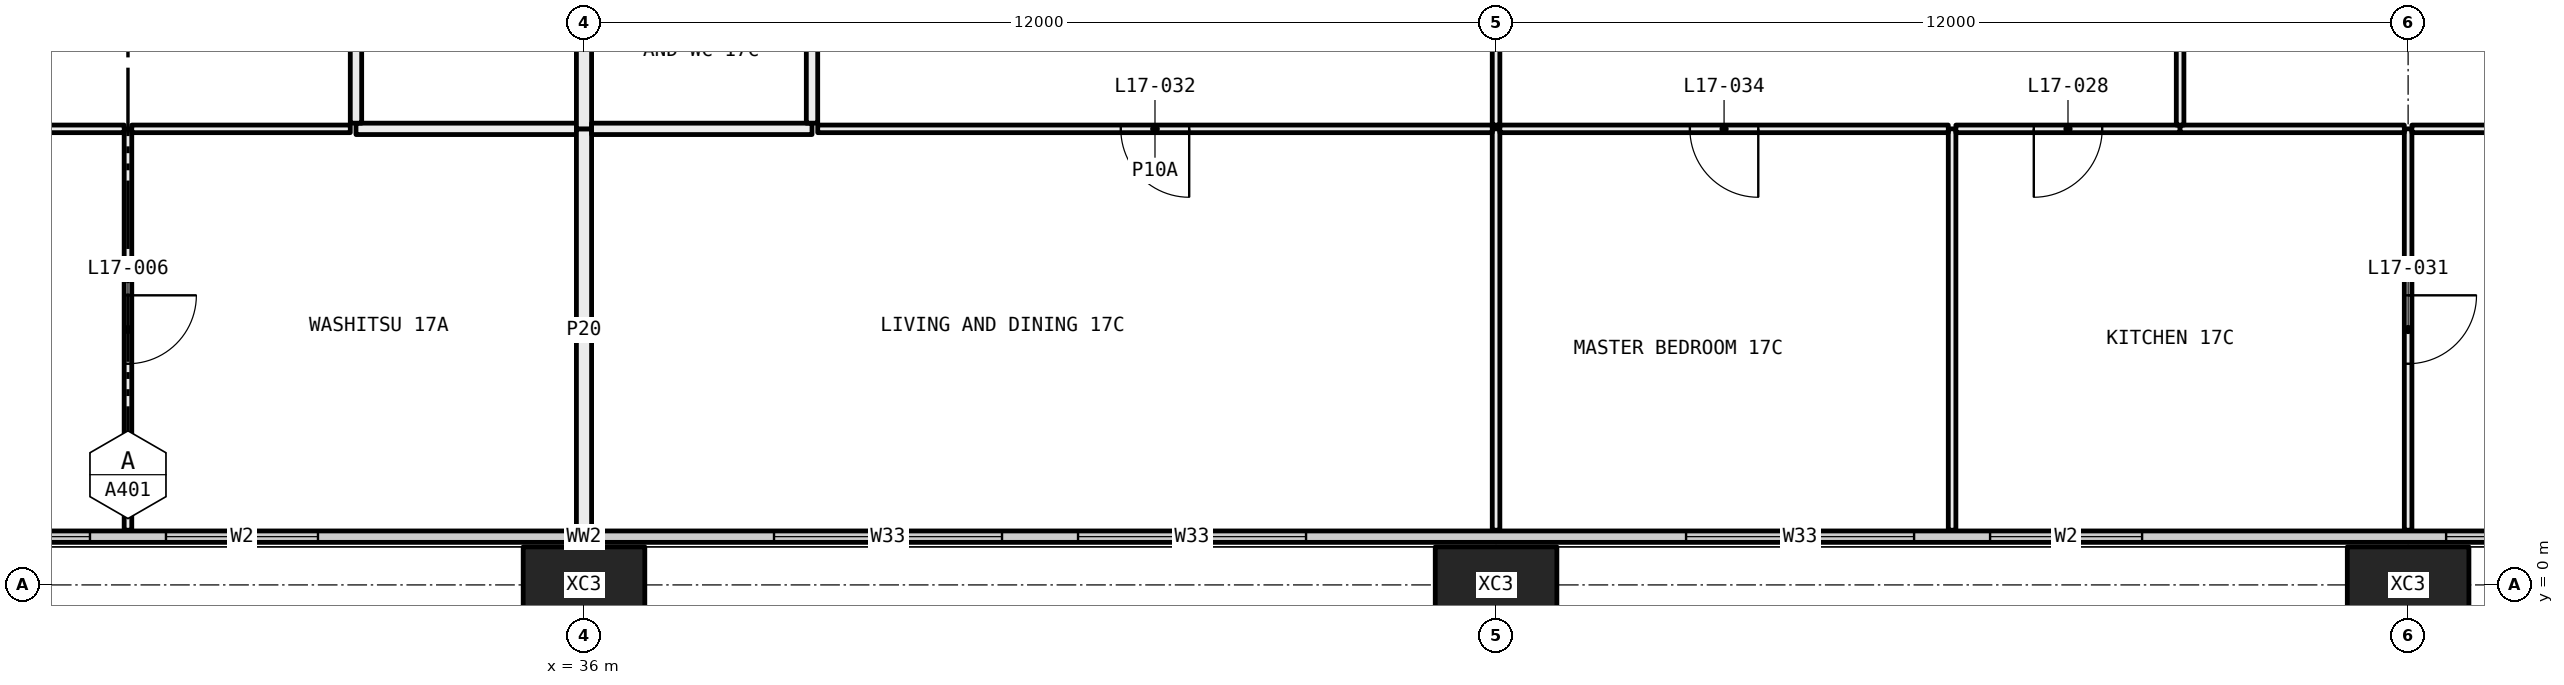
"""IFC4 building model, lengths in metres.
Left out: names, types, materials, properties, quantities, classifications, styles, units other than length and angle.
Written with IfcOpenShell. Run it as: python <this file> out.ifc"""

import sys

from ifc_helpers import new_model, si_unit, direction, frame, frame_2d, origin, origin_2d, place, context, subcontext, project, spatial, rectangle, hollow_rectangle, extrude, element, fill, save


model = new_model("IFC4")
c1 = context("Model", 3, precision=1e-05, world=origin(), true_north=direction((0.0, 1.0)))
c2 = subcontext(c1, "Body", "Model", "MODEL_VIEW")
j1 = project(units=[si_unit("LENGTHUNIT", "METRE"), si_unit("PLANEANGLEUNIT", "RADIAN")], contexts=[c1])
p1 = place(None, origin())
s1 = spatial("IfcSite", under=j1, at=p1, CompositionType="ELEMENT")
p2 = place(p1, origin())
s2 = spatial("IfcBuilding", under=s1, at=p2, CompositionType="ELEMENT")
p3 = place(p2, frame((0.0, 0.0, 71.4)))
s3 = spatial("IfcBuildingStorey", under=s2, at=p3, CompositionType="ELEMENT", Elevation=71.4)
for number, where, z_axis, x_axis in (
    (1, (36.0, 0.0, -0.4), (0.0, 0.0, 1.0), (1.0, 0.0, 0.0)),
    (2, (48.0, 0.0, -0.4), (0.0, 0.0, 1.0), (1.0, 0.0, 0.0)),
    (3, (60.0, 0.0, -0.4), (0.0, 0.0, 1.0), (1.0, 0.0, 0.0)),
):
    element("IfcColumn", number, at=place(p3, frame(where, z_axis=z_axis, x_axis=x_axis)), inside=s3, PredefinedType="COLUMN", context=c2, shape_type="SweptSolid", body=[
        extrude(hollow_rectangle(XDim=1.6, YDim=1.0, WallThickness=0.065, at=origin_2d()), origin(), (0.0, 0.0, 1.0), 3.45),
    ])
p4 = place(p3, frame((6.56, 0.635, 0.0), z_axis=(0.0, 0.0, 1.0), x_axis=(1.0, 0.0, 0.0)))
e4 = element("IfcWall", 4, at=p4, inside=s3, PredefinedType="ELEMENTEDWALL", context=c2, shape_type="SweptSolid", body=[
    extrude(rectangle(XDim=58.88, YDim=0.15, at=frame_2d((29.44, 0.0))), origin(), (0.0, 0.0, 1.0), 3.05),
])
p5 = place(p4, frame((0.44, 0.0, 0.45)))
e5 = element("IfcOpeningElement", 5, at=p5, cuts=e4, PredefinedType="OPENING", context=c2, shape_type="SweptSolid", body=[
    extrude(rectangle(XDim=4.5, YDim=2.55, at=frame_2d((2.25, 1.275))), frame((0.0, 0.085, 0.0), z_axis=(0.0, -1.0, 0.0), x_axis=(1.0, 0.0, 0.0)), (0.0, 0.0, 1.0), 0.17),
])
p6 = place(p4, frame((7.94, 0.0, 0.45)))
e6 = element("IfcOpeningElement", 6, at=p6, cuts=e4, PredefinedType="OPENING", context=c2, shape_type="SweptSolid", body=[
    extrude(rectangle(XDim=3.0, YDim=2.55, at=frame_2d((1.5, 1.275))), frame((0.0, 0.085, 0.0), z_axis=(0.0, -1.0, 0.0), x_axis=(1.0, 0.0, 0.0)), (0.0, 0.0, 1.0), 0.17),
])
p7 = place(p4, frame((11.94, 0.0, 0.45)))
e7 = element("IfcOpeningElement", 7, at=p7, cuts=e4, PredefinedType="OPENING", context=c2, shape_type="SweptSolid", body=[
    extrude(rectangle(XDim=3.0, YDim=2.55, at=frame_2d((1.5, 1.275))), frame((0.0, 0.085, 0.0), z_axis=(0.0, -1.0, 0.0), x_axis=(1.0, 0.0, 0.0)), (0.0, 0.0, 1.0), 0.17),
])
p8 = place(p4, frame((19.94, 0.0, 0.45)))
e8 = element("IfcOpeningElement", 8, at=p8, cuts=e4, PredefinedType="OPENING", context=c2, shape_type="SweptSolid", body=[
    extrude(rectangle(XDim=3.0, YDim=2.55, at=frame_2d((1.5, 1.275))), frame((0.0, 0.085, 0.0), z_axis=(0.0, -1.0, 0.0), x_axis=(1.0, 0.0, 0.0)), (0.0, 0.0, 1.0), 0.17),
])
p9 = place(p4, frame((23.94, 0.0, 0.45)))
e9 = element("IfcOpeningElement", 9, at=p9, cuts=e4, PredefinedType="OPENING", context=c2, shape_type="SweptSolid", body=[
    extrude(rectangle(XDim=2.0, YDim=2.55, at=frame_2d((1.0, 1.275))), frame((0.0, 0.085, 0.0), z_axis=(0.0, -1.0, 0.0), x_axis=(1.0, 0.0, 0.0)), (0.0, 0.0, 1.0), 0.17),
])
p10 = place(p4, frame((31.94, 0.0, 0.45)))
e10 = element("IfcOpeningElement", 10, at=p10, cuts=e4, PredefinedType="OPENING", context=c2, shape_type="SweptSolid", body=[
    extrude(rectangle(XDim=3.0, YDim=2.55, at=frame_2d((1.5, 1.275))), frame((0.0, 0.085, 0.0), z_axis=(0.0, -1.0, 0.0), x_axis=(1.0, 0.0, 0.0)), (0.0, 0.0, 1.0), 0.17),
])
p11 = place(p4, frame((35.94, 0.0, 0.45)))
e11 = element("IfcOpeningElement", 11, at=p11, cuts=e4, PredefinedType="OPENING", context=c2, shape_type="SweptSolid", body=[
    extrude(rectangle(XDim=3.0, YDim=2.55, at=frame_2d((1.5, 1.275))), frame((0.0, 0.085, 0.0), z_axis=(0.0, -1.0, 0.0), x_axis=(1.0, 0.0, 0.0)), (0.0, 0.0, 1.0), 0.17),
])
p12 = place(p4, frame((43.94, 0.0, 0.45)))
e12 = element("IfcOpeningElement", 12, at=p12, cuts=e4, PredefinedType="OPENING", context=c2, shape_type="SweptSolid", body=[
    extrude(rectangle(XDim=3.0, YDim=2.55, at=frame_2d((1.5, 1.275))), frame((0.0, 0.085, 0.0), z_axis=(0.0, -1.0, 0.0), x_axis=(1.0, 0.0, 0.0)), (0.0, 0.0, 1.0), 0.17),
])
p13 = place(p4, frame((47.94, 0.0, 0.45)))
e13 = element("IfcOpeningElement", 13, at=p13, cuts=e4, PredefinedType="OPENING", context=c2, shape_type="SweptSolid", body=[
    extrude(rectangle(XDim=2.0, YDim=2.55, at=frame_2d((1.0, 1.275))), frame((0.0, 0.085, 0.0), z_axis=(0.0, -1.0, 0.0), x_axis=(1.0, 0.0, 0.0)), (0.0, 0.0, 1.0), 0.17),
])
p14 = place(p4, frame((53.94, 0.0, 0.45)))
e14 = element("IfcOpeningElement", 14, at=p14, cuts=e4, PredefinedType="OPENING", context=c2, shape_type="SweptSolid", body=[
    extrude(rectangle(XDim=4.5, YDim=2.55, at=frame_2d((2.25, 1.275))), frame((0.0, 0.085, 0.0), z_axis=(0.0, -1.0, 0.0), x_axis=(1.0, 0.0, 0.0)), (0.0, 0.0, 1.0), 0.17),
])
p15 = place(p3, frame((30.0, 0.72, 0.0), z_axis=(0.0, 0.0, 1.0), x_axis=(0.0, 1.0, 0.0)))
e15 = element("IfcWall", 15, at=p15, inside=s3, PredefinedType="PARTITIONING", context=c2, shape_type="SweptSolid", body=[
    extrude(rectangle(XDim=5.28, YDim=0.1, at=frame_2d((2.64, 0.0))), origin(), (0.0, 0.0, 1.0), 3.05),
])
p16 = place(p15, frame((2.19, 0.0, 0.0)))
e16 = element("IfcOpeningElement", 16, at=p16, cuts=e15, PredefinedType="OPENING", context=c2, shape_type="SweptSolid", body=[
    extrude(rectangle(XDim=0.9, YDim=2.1, at=frame_2d((0.45, 1.05))), frame((0.0, 0.06, 0.0), z_axis=(0.0, -1.0, 0.0), x_axis=(1.0, 0.0, 0.0)), (0.0, 0.0, 1.0), 0.12),
])
p17 = place(p3, frame((29.95, 6.0, 0.0), z_axis=(0.0, 0.0, 1.0), x_axis=(-1.0, 0.0, 0.0)))
e17 = element("IfcWall", 17, at=p17, inside=s3, PredefinedType="PARTITIONING", context=c2, shape_type="SweptSolid", body=[
    extrude(rectangle(XDim=6.05, YDim=0.1, at=frame_2d((3.025, 0.0))), origin(), (0.0, 0.0, 1.0), 2.45),
])
p18 = place(p17, frame((2.575, 0.0, 0.0)))
e18 = element("IfcOpeningElement", 18, at=p18, cuts=e17, PredefinedType="OPENING", context=c2, shape_type="SweptSolid", body=[
    extrude(rectangle(XDim=0.9, YDim=2.1, at=frame_2d((0.45, 1.05))), frame((0.0, 0.06, 0.0), z_axis=(0.0, -1.0, 0.0), x_axis=(1.0, 0.0, 0.0)), (0.0, 0.0, 1.0), 0.12),
])
p19 = place(p3, frame((32.925, 6.0, 0.0), z_axis=(0.0, 0.0, 1.0), x_axis=(-1.0, 0.0, 0.0)))
e19 = element("IfcWall", 19, at=p19, inside=s3, PredefinedType="PARTITIONING", context=c2, shape_type="SweptSolid", body=[
    extrude(rectangle(XDim=2.875, YDim=0.1, at=frame_2d((1.438, 0.0))), origin(), (0.0, 0.0, 1.0), 3.05),
])
p20 = place(p3, frame((35.9, 6.0, 0.0), z_axis=(0.0, 0.0, 1.0), x_axis=(-1.0, 0.0, 0.0)))
e20 = element("IfcWall", 20, at=p20, inside=s3, PredefinedType="PARTITIONING", context=c2, shape_type="SweptSolid", body=[
    extrude(rectangle(XDim=2.9, YDim=0.15, at=frame_2d((1.45, 0.0))), origin(), (0.0, 0.0, 1.0), 3.05),
])
p21 = place(p3, frame((36.0, 0.72, 0.0), z_axis=(0.0, 0.0, 1.0), x_axis=(0.0, 1.0, 0.0)))
e21 = element("IfcWall", 21, at=p21, inside=s3, PredefinedType="PARTITIONING", context=c2, shape_type="SweptSolid", body=[
    extrude(rectangle(XDim=5.28, YDim=0.2, at=frame_2d((2.64, 0.0))), origin(), (0.0, 0.0, 1.0), 2.45),
])
p22 = place(p3, frame((33.0, 6.075, 0.0), z_axis=(0.0, 0.0, 1.0), x_axis=(0.0, 1.0, 0.0)))
e22 = element("IfcWall", 22, at=p22, inside=s3, PredefinedType="PARTITIONING", context=c2, shape_type="SweptSolid", body=[
    extrude(rectangle(XDim=5.925, YDim=0.15, at=frame_2d((2.962, 0.0))), origin(), (0.0, 0.0, 1.0), 2.45),
])
p23 = place(p22, frame((2.512, 0.0, 0.0)))
e23 = element("IfcOpeningElement", 23, at=p23, cuts=e22, PredefinedType="OPENING", context=c2, shape_type="SweptSolid", body=[
    extrude(rectangle(XDim=0.9, YDim=2.1, at=frame_2d((0.45, 1.05))), frame((0.0, 0.085, 0.0), z_axis=(0.0, -1.0, 0.0), x_axis=(1.0, 0.0, 0.0)), (0.0, 0.0, 1.0), 0.17),
])
p24 = place(p3, frame((36.0, 6.0, 0.0), z_axis=(0.0, 0.0, 1.0), x_axis=(0.0, 1.0, 0.0)))
e24 = element("IfcWall", 24, at=p24, inside=s3, PredefinedType="PARTITIONING", context=c2, shape_type="SweptSolid", body=[
    extrude(rectangle(XDim=5.2, YDim=0.2, at=frame_2d((2.6, 0.0))), origin(), (0.0, 0.0, 1.0), 2.45),
])
p25 = place(p3, frame((48.0, 0.72, 0.0), z_axis=(0.0, 0.0, 1.0), x_axis=(0.0, 1.0, 0.0)))
e25 = element("IfcWall", 25, at=p25, inside=s3, PredefinedType="PARTITIONING", context=c2, shape_type="SweptSolid", body=[
    extrude(rectangle(XDim=5.28, YDim=0.1, at=frame_2d((2.64, 0.0))), origin(), (0.0, 0.0, 1.0), 2.45),
])
p26 = place(p3, frame((39.0, 6.0, 0.0), z_axis=(0.0, 0.0, 1.0), x_axis=(-1.0, 0.0, 0.0)))
e26 = element("IfcWall", 26, at=p26, inside=s3, PredefinedType="PARTITIONING", context=c2, shape_type="SweptSolid", body=[
    extrude(rectangle(XDim=2.9, YDim=0.15, at=frame_2d((1.45, 0.0))), origin(), (0.0, 0.0, 1.0), 3.05),
])
p27 = place(p3, frame((47.95, 6.0, 0.0), z_axis=(0.0, 0.0, 1.0), x_axis=(-1.0, 0.0, 0.0)))
e27 = element("IfcWall", 27, at=p27, inside=s3, PredefinedType="PARTITIONING", context=c2, shape_type="SweptSolid", body=[
    extrude(rectangle(XDim=8.875, YDim=0.1, at=frame_2d((4.438, 0.0))), origin(), (0.0, 0.0, 1.0), 2.45),
])
p28 = place(p27, frame((3.988, 0.0, 0.0)))
e28 = element("IfcOpeningElement", 28, at=p28, cuts=e27, PredefinedType="OPENING", context=c2, shape_type="SweptSolid", body=[
    extrude(rectangle(XDim=0.9, YDim=2.1, at=frame_2d((0.45, 1.05))), frame((0.0, 0.06, 0.0), z_axis=(0.0, -1.0, 0.0), x_axis=(1.0, 0.0, 0.0)), (0.0, 0.0, 1.0), 0.12),
])
p29 = place(p3, frame((54.0, 0.72, 0.0), z_axis=(0.0, 0.0, 1.0), x_axis=(0.0, 1.0, 0.0)))
e29 = element("IfcWall", 29, at=p29, inside=s3, PredefinedType="PARTITIONING", context=c2, shape_type="SweptSolid", body=[
    extrude(rectangle(XDim=5.28, YDim=0.1, at=frame_2d((2.64, 0.0))), origin(), (0.0, 0.0, 1.0), 3.05),
])
p30 = place(p3, frame((53.95, 6.0, 0.0), z_axis=(0.0, 0.0, 1.0), x_axis=(-1.0, 0.0, 0.0)))
e30 = element("IfcWall", 30, at=p30, inside=s3, PredefinedType="PARTITIONING", context=c2, shape_type="SweptSolid", body=[
    extrude(rectangle(XDim=5.9, YDim=0.1, at=frame_2d((2.95, 0.0))), origin(), (0.0, 0.0, 1.0), 2.45),
])
p31 = place(p30, frame((2.5, 0.0, 0.0)))
e31 = element("IfcOpeningElement", 31, at=p31, cuts=e30, PredefinedType="OPENING", context=c2, shape_type="SweptSolid", body=[
    extrude(rectangle(XDim=0.9, YDim=2.1, at=frame_2d((0.45, 1.05))), frame((0.0, 0.06, 0.0), z_axis=(0.0, -1.0, 0.0), x_axis=(1.0, 0.0, 0.0)), (0.0, 0.0, 1.0), 0.12),
])
p32 = place(p3, frame((60.0, 0.72, 0.0), z_axis=(0.0, 0.0, 1.0), x_axis=(0.0, 1.0, 0.0)))
e32 = element("IfcWall", 32, at=p32, inside=s3, PredefinedType="PARTITIONING", context=c2, shape_type="SweptSolid", body=[
    extrude(rectangle(XDim=5.28, YDim=0.1, at=frame_2d((2.64, 0.0))), origin(), (0.0, 0.0, 1.0), 2.45),
])
p33 = place(p32, frame((2.19, 0.0, 0.0)))
e33 = element("IfcOpeningElement", 33, at=p33, cuts=e32, PredefinedType="OPENING", context=c2, shape_type="SweptSolid", body=[
    extrude(rectangle(XDim=0.9, YDim=2.1, at=frame_2d((0.45, 1.05))), frame((0.0, 0.06, 0.0), z_axis=(0.0, -1.0, 0.0), x_axis=(1.0, 0.0, 0.0)), (0.0, 0.0, 1.0), 0.12),
])
p34 = place(p3, frame((57.0, 6.0, 0.0), z_axis=(0.0, 0.0, 1.0), x_axis=(-1.0, 0.0, 0.0)))
e34 = element("IfcWall", 34, at=p34, inside=s3, PredefinedType="PARTITIONING", context=c2, shape_type="SweptSolid", body=[
    extrude(rectangle(XDim=2.95, YDim=0.1, at=frame_2d((1.475, 0.0))), origin(), (0.0, 0.0, 1.0), 3.05),
])
p35 = place(p34, frame((1.025, 0.0, 0.0)))
e35 = element("IfcOpeningElement", 35, at=p35, cuts=e34, PredefinedType="OPENING", context=c2, shape_type="SweptSolid", body=[
    extrude(rectangle(XDim=0.9, YDim=2.1, at=frame_2d((0.45, 1.05))), frame((0.0, 0.06, 0.0), z_axis=(0.0, -1.0, 0.0), x_axis=(1.0, 0.0, 0.0)), (0.0, 0.0, 1.0), 0.12),
])
p36 = place(p3, frame((59.95, 6.0, 0.0), z_axis=(0.0, 0.0, 1.0), x_axis=(-1.0, 0.0, 0.0)))
e36 = element("IfcWall", 36, at=p36, inside=s3, PredefinedType="PARTITIONING", context=c2, shape_type="SweptSolid", body=[
    extrude(rectangle(XDim=2.95, YDim=0.1, at=frame_2d((1.475, 0.0))), origin(), (0.0, 0.0, 1.0), 2.45),
])
p37 = place(p3, frame((65.28, 6.0, 0.0), z_axis=(0.0, 0.0, 1.0), x_axis=(-1.0, 0.0, 0.0)))
e37 = element("IfcWall", 37, at=p37, inside=s3, PredefinedType="PARTITIONING", context=c2, shape_type="SweptSolid", body=[
    extrude(rectangle(XDim=5.23, YDim=0.1, at=frame_2d((2.615, 0.0))), origin(), (0.0, 0.0, 1.0), 2.45),
])
p38 = place(p3, frame((39.0, 6.075, 0.0), z_axis=(0.0, 0.0, 1.0), x_axis=(0.0, 1.0, 0.0)))
e38 = element("IfcWall", 38, at=p38, inside=s3, PredefinedType="PARTITIONING", context=c2, shape_type="SweptSolid", body=[
    extrude(rectangle(XDim=5.925, YDim=0.15, at=frame_2d((2.962, 0.0))), origin(), (0.0, 0.0, 1.0), 2.45),
])
p39 = place(p38, frame((2.512, 0.0, 0.0)))
e39 = element("IfcOpeningElement", 39, at=p39, cuts=e38, PredefinedType="OPENING", context=c2, shape_type="SweptSolid", body=[
    extrude(rectangle(XDim=0.9, YDim=2.1, at=frame_2d((0.45, 1.05))), frame((0.0, 0.085, 0.0), z_axis=(0.0, -1.0, 0.0), x_axis=(1.0, 0.0, 0.0)), (0.0, 0.0, 1.0), 0.17),
])
p40 = place(p3, frame((48.0, 6.05, 0.0), z_axis=(0.0, 0.0, 1.0), x_axis=(0.0, 1.0, 0.0)))
e40 = element("IfcWall", 40, at=p40, inside=s3, PredefinedType="PARTITIONING", context=c2, shape_type="SweptSolid", body=[
    extrude(rectangle(XDim=5.15, YDim=0.1, at=frame_2d((2.575, 0.0))), origin(), (0.0, 0.0, 1.0), 2.45),
])
p41 = place(p40, frame((2.125, 0.0, 0.0)))
e41 = element("IfcOpeningElement", 41, at=p41, cuts=e40, PredefinedType="OPENING", context=c2, shape_type="SweptSolid", body=[
    extrude(rectangle(XDim=0.9, YDim=2.1, at=frame_2d((0.45, 1.05))), frame((0.0, 0.06, 0.0), z_axis=(0.0, -1.0, 0.0), x_axis=(1.0, 0.0, 0.0)), (0.0, 0.0, 1.0), 0.12),
])
p42 = place(p3, frame((57.0, 6.05, 0.0), z_axis=(0.0, 0.0, 1.0), x_axis=(0.0, 1.0, 0.0)))
e42 = element("IfcWall", 42, at=p42, inside=s3, PredefinedType="PARTITIONING", context=c2, shape_type="SweptSolid", body=[
    extrude(rectangle(XDim=5.95, YDim=0.1, at=frame_2d((2.975, 0.0))), origin(), (0.0, 0.0, 1.0), 2.45),
])
p43 = place(p42, frame((2.525, 0.0, 0.0)))
e43 = element("IfcOpeningElement", 43, at=p43, cuts=e42, PredefinedType="OPENING", context=c2, shape_type="SweptSolid", body=[
    extrude(rectangle(XDim=0.9, YDim=2.1, at=frame_2d((0.45, 1.05))), frame((0.0, 0.06, 0.0), z_axis=(0.0, -1.0, 0.0), x_axis=(1.0, 0.0, 0.0)), (0.0, 0.0, 1.0), 0.12),
])
p44 = place(p8, origin())
e44 = element("IfcWindow", 44, at=p44, inside=s3, PartitioningType="SINGLE_PANEL", PredefinedType="WINDOW", context=c2, shape_type="SweptSolid", body=[
    extrude(rectangle(XDim=3.0, YDim=2.55, at=frame_2d((1.5, 1.275))), frame((0.0, 0.03, 0.0), z_axis=(0.0, -1.0, 0.0), x_axis=(1.0, 0.0, 0.0)), (0.0, 0.0, 1.0), 0.06),
])
fill(e8, e44)
p45 = place(p9, origin())
e45 = element("IfcWindow", 45, at=p45, inside=s3, PartitioningType="SINGLE_PANEL", PredefinedType="WINDOW", context=c2, shape_type="SweptSolid", body=[
    extrude(rectangle(XDim=2.0, YDim=2.55, at=frame_2d((1.0, 1.275))), frame((0.0, 0.03, 0.0), z_axis=(0.0, -1.0, 0.0), x_axis=(1.0, 0.0, 0.0)), (0.0, 0.0, 1.0), 0.06),
])
fill(e9, e45)
p46 = place(p10, origin())
e46 = element("IfcWindow", 46, at=p46, inside=s3, PartitioningType="SINGLE_PANEL", PredefinedType="WINDOW", context=c2, shape_type="SweptSolid", body=[
    extrude(rectangle(XDim=3.0, YDim=2.55, at=frame_2d((1.5, 1.275))), frame((0.0, 0.03, 0.0), z_axis=(0.0, -1.0, 0.0), x_axis=(1.0, 0.0, 0.0)), (0.0, 0.0, 1.0), 0.06),
])
fill(e10, e46)
p47 = place(p11, origin())
e47 = element("IfcWindow", 47, at=p47, inside=s3, PartitioningType="SINGLE_PANEL", PredefinedType="WINDOW", context=c2, shape_type="SweptSolid", body=[
    extrude(rectangle(XDim=3.0, YDim=2.55, at=frame_2d((1.5, 1.275))), frame((0.0, 0.03, 0.0), z_axis=(0.0, -1.0, 0.0), x_axis=(1.0, 0.0, 0.0)), (0.0, 0.0, 1.0), 0.06),
])
fill(e11, e47)
p48 = place(p12, origin())
e48 = element("IfcWindow", 48, at=p48, inside=s3, PartitioningType="SINGLE_PANEL", PredefinedType="WINDOW", context=c2, shape_type="SweptSolid", body=[
    extrude(rectangle(XDim=3.0, YDim=2.55, at=frame_2d((1.5, 1.275))), frame((0.0, 0.03, 0.0), z_axis=(0.0, -1.0, 0.0), x_axis=(1.0, 0.0, 0.0)), (0.0, 0.0, 1.0), 0.06),
])
fill(e12, e48)
p49 = place(p13, origin())
e49 = element("IfcWindow", 49, at=p49, inside=s3, PartitioningType="SINGLE_PANEL", PredefinedType="WINDOW", context=c2, shape_type="SweptSolid", body=[
    extrude(rectangle(XDim=2.0, YDim=2.55, at=frame_2d((1.0, 1.275))), frame((0.0, 0.03, 0.0), z_axis=(0.0, -1.0, 0.0), x_axis=(1.0, 0.0, 0.0)), (0.0, 0.0, 1.0), 0.06),
])
fill(e13, e49)
p50 = place(p14, origin())
e50 = element("IfcWindow", 50, at=p50, inside=s3, PartitioningType="SINGLE_PANEL", PredefinedType="WINDOW", context=c2, shape_type="SweptSolid", body=[
    extrude(rectangle(XDim=4.5, YDim=2.55, at=frame_2d((2.25, 1.275))), frame((0.0, 0.03, 0.0), z_axis=(0.0, -1.0, 0.0), x_axis=(1.0, 0.0, 0.0)), (0.0, 0.0, 1.0), 0.06),
])
fill(e14, e50)
p51 = place(p16, frame((0.9, 0.0, 0.0), x_axis=(-1.0, 0.0, 0.0)))
e51 = element("IfcDoor", 51, at=p51, inside=s3, OperationType="SINGLE_SWING_RIGHT", PredefinedType="DOOR", context=c2, shape_type="SweptSolid", body=[
    extrude(rectangle(XDim=0.9, YDim=2.1, at=frame_2d((0.45, 1.05))), frame((0.0, 0.025, 0.0), z_axis=(0.0, -1.0, 0.0), x_axis=(1.0, 0.0, 0.0)), (0.0, 0.0, 1.0), 0.05),
])
fill(e16, e51)
p52 = place(p35, origin())
e52 = element("IfcDoor", 52, at=p52, inside=s3, OperationType="SINGLE_SWING_LEFT", PredefinedType="DOOR", context=c2, shape_type="SweptSolid", body=[
    extrude(rectangle(XDim=0.9, YDim=2.1, at=frame_2d((0.45, 1.05))), frame((0.0, 0.025, 0.0), z_axis=(0.0, -1.0, 0.0), x_axis=(1.0, 0.0, 0.0)), (0.0, 0.0, 1.0), 0.05),
])
fill(e35, e52)
p53 = place(p33, frame((0.9, 0.0, 0.0), x_axis=(-1.0, 0.0, 0.0)))
e53 = element("IfcDoor", 53, at=p53, inside=s3, OperationType="SINGLE_SWING_RIGHT", PredefinedType="DOOR", context=c2, shape_type="SweptSolid", body=[
    extrude(rectangle(XDim=0.9, YDim=2.1, at=frame_2d((0.45, 1.05))), frame((0.0, 0.025, 0.0), z_axis=(0.0, -1.0, 0.0), x_axis=(1.0, 0.0, 0.0)), (0.0, 0.0, 1.0), 0.05),
])
fill(e33, e53)
p54 = place(p28, origin())
e54 = element("IfcDoor", 54, at=p54, inside=s3, OperationType="SINGLE_SWING_RIGHT", PredefinedType="DOOR", context=c2, shape_type="SweptSolid", body=[
    extrude(rectangle(XDim=0.9, YDim=2.1, at=frame_2d((0.45, 1.05))), frame((0.0, 0.025, 0.0), z_axis=(0.0, -1.0, 0.0), x_axis=(1.0, 0.0, 0.0)), (0.0, 0.0, 1.0), 0.05),
])
fill(e28, e54)
p55 = place(p31, origin())
e55 = element("IfcDoor", 55, at=p55, inside=s3, OperationType="SINGLE_SWING_RIGHT", PredefinedType="DOOR", context=c2, shape_type="SweptSolid", body=[
    extrude(rectangle(XDim=0.9, YDim=2.1, at=frame_2d((0.45, 1.05))), frame((0.0, 0.025, 0.0), z_axis=(0.0, -1.0, 0.0), x_axis=(1.0, 0.0, 0.0)), (0.0, 0.0, 1.0), 0.05),
])
fill(e31, e55)
save(model, sys.argv[1])
